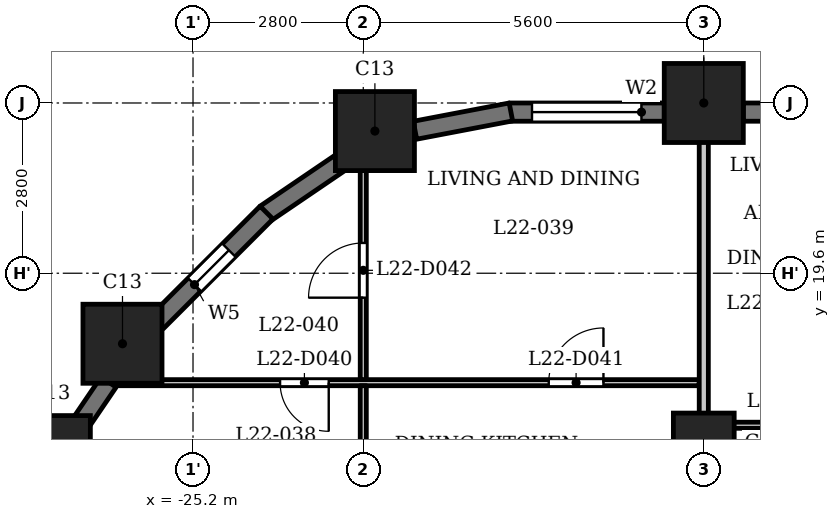
"""IFC4 building model, lengths in metres.
Left out: names, types, materials, properties, quantities, classifications, styles, units other than length and angle.
Written with IfcOpenShell. Run it as: python <this file> out.ifc"""

import sys

from ifc_helpers import new_model, si_unit, direction, frame, frame_2d, origin, origin_2d, place, context, subcontext, project, spatial, rectangle, extrude, element, fill, save


model = new_model("IFC4")
c1 = context("Model", 3, precision=1e-05, world=origin(), true_north=direction((0.0, 1.0)))
c2 = subcontext(c1, "Body", "Model", "MODEL_VIEW")
j1 = project(units=[si_unit("LENGTHUNIT", "METRE"), si_unit("PLANEANGLEUNIT", "RADIAN")], contexts=[c1])
p1 = place(None, origin())
s1 = spatial("IfcSite", under=j1, at=p1, CompositionType="ELEMENT")
p2 = place(p1, origin())
s2 = spatial("IfcBuilding", under=s1, at=p2, CompositionType="ELEMENT")
p3 = place(p2, frame((0.0, 0.0, 90.3)))
s3 = spatial("IfcBuildingStorey", under=s2, at=p3, CompositionType="ELEMENT", Elevation=90.3)
for number, where, z_axis, x_axis in (
    (1, (-16.8, 22.4, 0.0), (0.0, 0.0, 1.0), (1.0, 0.0, 0.0)),
    (2, (-22.209, 21.938, 0.0), (0.0, 0.0, 1.0), (1.0, 0.0, 0.0)),
    (3, (-26.36, 18.44, 0.0), (0.0, 0.0, 1.0), (1.0, 0.0, 0.0)),
    (4, (-27.538, 16.609, 0.0), (0.0, 0.0, 1.0), (1.0, 0.0, 0.0)),
):
    element("IfcColumn", number, at=place(p3, frame(where, z_axis=z_axis, x_axis=x_axis)), inside=s3, PredefinedType="COLUMN", context=c2, shape_type="SweptSolid", body=[
        extrude(rectangle(XDim=1.3, YDim=1.3, at=origin_2d()), origin(), (0.0, 0.0, 1.0), 3.5),
    ])
p4 = place(p3, frame((-16.8, 16.8, 0.0), z_axis=(0.0, 0.0, 1.0), x_axis=(1.0, 0.0, 0.0)))
e5 = element("IfcColumn", 5, at=p4, inside=s3, PredefinedType="COLUMN", context=c2, shape_type="SweptSolid", body=[
    extrude(rectangle(XDim=1.0, YDim=1.0, at=origin_2d()), origin(), (0.0, 0.0, 1.0), 3.5),
])
p5 = place(p3, frame((-11.85, 22.25, 0.0), z_axis=(0.0, 0.0, 1.0), x_axis=(-1.0, 0.0, 0.0)))
e6 = element("IfcWall", 6, at=p5, inside=s3, PredefinedType="SOLIDWALL", context=c2, shape_type="SweptSolid", body=[
    extrude(rectangle(XDim=4.3, YDim=0.3, at=frame_2d((2.15, 0.0))), origin(), (0.0, 0.0, 1.0), 2.4),
])
p6 = place(p5, frame((0.538, 0.0, 0.6)))
e7 = element("IfcOpeningElement", 7, at=p6, cuts=e6, PredefinedType="OPENING", context=c2, shape_type="SweptSolid", body=[
    extrude(rectangle(XDim=1.2, YDim=1.55, at=frame_2d((0.6, 0.775))), frame((0.0, 0.16, 0.0), z_axis=(0.0, -1.0, 0.0), x_axis=(1.0, 0.0, 0.0)), (0.0, 0.0, 1.0), 0.32),
])
p7 = place(p5, frame((2.762, 0.0, 0.6)))
e8 = element("IfcOpeningElement", 8, at=p7, cuts=e6, PredefinedType="OPENING", context=c2, shape_type="SweptSolid", body=[
    extrude(rectangle(XDim=1.2, YDim=1.55, at=frame_2d((0.6, 0.775))), frame((0.0, 0.16, 0.0), z_axis=(0.0, -1.0, 0.0), x_axis=(1.0, 0.0, 0.0)), (0.0, 0.0, 1.0), 0.32),
])
p8 = place(p3, frame((-17.45, 22.25, 0.0), z_axis=(0.0, 0.0, 1.0), x_axis=(-1.0, 0.0, 0.0)))
e9 = element("IfcWall", 9, at=p8, inside=s3, PredefinedType="SOLIDWALL", context=c2, shape_type="SweptSolid", body=[
    extrude(rectangle(XDim=2.55, YDim=0.3, at=frame_2d((1.275, 0.0))), origin(), (0.0, 0.0, 1.0), 2.4),
])
p9 = place(p8, frame((0.375, 0.0, 0.9)))
e10 = element("IfcOpeningElement", 10, at=p9, cuts=e9, PredefinedType="OPENING", context=c2, shape_type="SweptSolid", body=[
    extrude(rectangle(XDim=1.8, YDim=1.25, at=frame_2d((0.9, 0.625))), frame((0.0, 0.16, 0.0), z_axis=(0.0, -1.0, 0.0), x_axis=(1.0, 0.0, 0.0)), (0.0, 0.0, 1.0), 0.32),
])
for number, where, z_axis, x_axis in (
    (11, (-19.972, 22.253, 0.0), (0.0, 0.0, 1.0), (-0.982, -0.187, 0.0)),
    (12, (-22.684, 21.482, 0.0), (0.0, 0.0, 1.0), (-0.827, -0.562, 0.0)),
):
    element("IfcWall", number, at=place(p3, frame(where, z_axis=z_axis, x_axis=x_axis)), inside=s3, PredefinedType="SOLIDWALL", context=c2, shape_type="SweptSolid", body=[
        extrude(rectangle(XDim=1.606, YDim=0.3, at=frame_2d((0.803, 0.0))), origin(), (0.0, 0.0, 1.0), 2.4),
    ])
p10 = place(p3, frame((-23.991, 20.597, 0.0), z_axis=(0.0, 0.0, 1.0), x_axis=(-0.707106781187, -0.707106781187, 0.0)))
e13 = element("IfcWall", 13, at=p10, inside=s3, PredefinedType="SOLIDWALL", context=c2, shape_type="SweptSolid", body=[
    extrude(rectangle(XDim=2.55, YDim=0.3, at=frame_2d((1.275, 0.0))), origin(), (0.0, 0.0, 1.0), 2.4),
])
p11 = place(p10, frame((0.875, 0.0, 0.6)))
e14 = element("IfcOpeningElement", 14, at=p11, cuts=e13, PredefinedType="OPENING", context=c2, shape_type="SweptSolid", body=[
    extrude(rectangle(XDim=0.8, YDim=1.55, at=frame_2d((0.4, 0.775))), frame((0.0, 0.16, 0.0), z_axis=(0.0, -1.0, 0.0), x_axis=(1.0, 0.0, 0.0)), (0.0, 0.0, 1.0), 0.32),
])
p12 = place(p3, frame((-26.589, 17.81, 0.0), z_axis=(0.0, 0.0, 1.0), x_axis=(-0.562066330934, -0.827092159091, 0.0)))
e15 = element("IfcWall", 15, at=p12, inside=s3, PredefinedType="SOLIDWALL", context=c2, shape_type="SweptSolid", body=[
    extrude(rectangle(XDim=0.877, YDim=0.3, at=frame_2d((0.438, 0.0))), origin(), (0.0, 0.0, 1.0), 3.2),
])
p13 = place(p3, frame((-16.725, 17.1, 0.0), z_axis=(0.0, 0.0, 1.0), x_axis=(1.0, 0.0, 0.0)))
e16 = element("IfcWall", 16, at=p13, inside=s3, PredefinedType="PARTITIONING", context=c2, shape_type="SweptSolid", body=[
    extrude(rectangle(XDim=33.45, YDim=0.1, at=frame_2d((16.725, 0.0))), origin(), (0.0, 0.0, 1.0), 3.2),
])
p14 = place(p13, frame((3.925, 0.0, 0.0)))
e17 = element("IfcOpeningElement", 17, at=p14, cuts=e16, PredefinedType="OPENING", context=c2, shape_type="SweptSolid", body=[
    extrude(rectangle(XDim=0.8, YDim=2.1, at=frame_2d((0.4, 1.05))), frame((0.0, 0.06, 0.0), z_axis=(0.0, -1.0, 0.0), x_axis=(1.0, 0.0, 0.0)), (0.0, 0.0, 1.0), 0.12),
])
p15 = place(p13, frame((0.975, 0.0, 0.0)))
e18 = element("IfcOpeningElement", 18, at=p15, cuts=e16, PredefinedType="OPENING", context=c2, shape_type="SweptSolid", body=[
    extrude(rectangle(XDim=0.9, YDim=2.1, at=frame_2d((0.45, 1.05))), frame((0.0, 0.06, 0.0), z_axis=(0.0, -1.0, 0.0), x_axis=(1.0, 0.0, 0.0)), (0.0, 0.0, 1.0), 0.12),
])
p16 = place(p13, frame((6.425, 0.0, 0.0)))
e19 = element("IfcOpeningElement", 19, at=p16, cuts=e16, PredefinedType="OPENING", context=c2, shape_type="SweptSolid", body=[
    extrude(rectangle(XDim=0.8, YDim=2.1, at=frame_2d((0.4, 1.05))), frame((0.0, 0.06, 0.0), z_axis=(0.0, -1.0, 0.0), x_axis=(1.0, 0.0, 0.0)), (0.0, 0.0, 1.0), 0.12),
])
p17 = place(p13, frame((8.825, 0.0, 0.0)))
e20 = element("IfcOpeningElement", 20, at=p17, cuts=e16, PredefinedType="OPENING", context=c2, shape_type="SweptSolid", body=[
    extrude(rectangle(XDim=0.9, YDim=2.1, at=frame_2d((0.45, 1.05))), frame((0.0, 0.06, 0.0), z_axis=(0.0, -1.0, 0.0), x_axis=(1.0, 0.0, 0.0)), (0.0, 0.0, 1.0), 0.12),
])
p18 = place(p13, frame((12.375, 0.0, 0.0)))
e21 = element("IfcOpeningElement", 21, at=p18, cuts=e16, PredefinedType="OPENING", context=c2, shape_type="SweptSolid", body=[
    extrude(rectangle(XDim=0.9, YDim=2.1, at=frame_2d((0.45, 1.05))), frame((0.0, 0.06, 0.0), z_axis=(0.0, -1.0, 0.0), x_axis=(1.0, 0.0, 0.0)), (0.0, 0.0, 1.0), 0.12),
])
p19 = place(p13, frame((14.425, 0.0, 0.0)))
e22 = element("IfcOpeningElement", 22, at=p19, cuts=e16, PredefinedType="OPENING", context=c2, shape_type="SweptSolid", body=[
    extrude(rectangle(XDim=0.9, YDim=2.1, at=frame_2d((0.45, 1.05))), frame((0.0, 0.06, 0.0), z_axis=(0.0, -1.0, 0.0), x_axis=(1.0, 0.0, 0.0)), (0.0, 0.0, 1.0), 0.12),
])
p20 = place(p13, frame((26.225, 0.0, 0.0)))
e23 = element("IfcOpeningElement", 23, at=p20, cuts=e16, PredefinedType="OPENING", context=c2, shape_type="SweptSolid", body=[
    extrude(rectangle(XDim=0.8, YDim=2.1, at=frame_2d((0.4, 1.05))), frame((0.0, 0.06, 0.0), z_axis=(0.0, -1.0, 0.0), x_axis=(1.0, 0.0, 0.0)), (0.0, 0.0, 1.0), 0.12),
])
p21 = place(p13, frame((23.025, 0.0, 0.0)))
e24 = element("IfcOpeningElement", 24, at=p21, cuts=e16, PredefinedType="OPENING", context=c2, shape_type="SweptSolid", body=[
    extrude(rectangle(XDim=0.9, YDim=2.1, at=frame_2d((0.45, 1.05))), frame((0.0, 0.06, 0.0), z_axis=(0.0, -1.0, 0.0), x_axis=(1.0, 0.0, 0.0)), (0.0, 0.0, 1.0), 0.12),
])
p22 = place(p13, frame((17.775, 0.0, 0.0)))
e25 = element("IfcOpeningElement", 25, at=p22, cuts=e16, PredefinedType="OPENING", context=c2, shape_type="SweptSolid", body=[
    extrude(rectangle(XDim=0.9, YDim=2.1, at=frame_2d((0.45, 1.05))), frame((0.0, 0.06, 0.0), z_axis=(0.0, -1.0, 0.0), x_axis=(1.0, 0.0, 0.0)), (0.0, 0.0, 1.0), 0.12),
])
p23 = place(p13, frame((20.025, 0.0, 0.0)))
e26 = element("IfcOpeningElement", 26, at=p23, cuts=e16, PredefinedType="OPENING", context=c2, shape_type="SweptSolid", body=[
    extrude(rectangle(XDim=0.9, YDim=2.1, at=frame_2d((0.45, 1.05))), frame((0.0, 0.06, 0.0), z_axis=(0.0, -1.0, 0.0), x_axis=(1.0, 0.0, 0.0)), (0.0, 0.0, 1.0), 0.12),
])
p24 = place(p13, frame((28.825, 0.0, 0.0)))
e27 = element("IfcOpeningElement", 27, at=p24, cuts=e16, PredefinedType="OPENING", context=c2, shape_type="SweptSolid", body=[
    extrude(rectangle(XDim=0.8, YDim=2.1, at=frame_2d((0.4, 1.05))), frame((0.0, 0.06, 0.0), z_axis=(0.0, -1.0, 0.0), x_axis=(1.0, 0.0, 0.0)), (0.0, 0.0, 1.0), 0.12),
])
p25 = place(p13, frame((31.975, 0.0, 0.0)))
e28 = element("IfcOpeningElement", 28, at=p25, cuts=e16, PredefinedType="OPENING", context=c2, shape_type="SweptSolid", body=[
    extrude(rectangle(XDim=0.9, YDim=2.1, at=frame_2d((0.45, 1.05))), frame((0.0, 0.06, 0.0), z_axis=(0.0, -1.0, 0.0), x_axis=(1.0, 0.0, 0.0)), (0.0, 0.0, 1.0), 0.12),
])
p26 = place(p3, frame((-26.554, 17.8, 0.0), z_axis=(0.0, 0.0, 1.0), x_axis=(1.0, 0.0, 0.0)))
e29 = element("IfcWall", 29, at=p26, inside=s3, PredefinedType="PARTITIONING", context=c2, shape_type="SweptSolid", body=[
    extrude(rectangle(XDim=9.679, YDim=0.1, at=frame_2d((4.84, 0.0))), origin(), (0.0, 0.0, 1.0), 3.2),
])
p27 = place(p26, frame((2.786, 0.0, 0.0)))
e30 = element("IfcOpeningElement", 30, at=p27, cuts=e29, PredefinedType="OPENING", context=c2, shape_type="SweptSolid", body=[
    extrude(rectangle(XDim=0.8, YDim=2.1, at=frame_2d((0.4, 1.05))), frame((0.0, 0.06, 0.0), z_axis=(0.0, -1.0, 0.0), x_axis=(1.0, 0.0, 0.0)), (0.0, 0.0, 1.0), 0.12),
])
p28 = place(p26, frame((7.204, 0.0, 0.0)))
e31 = element("IfcOpeningElement", 31, at=p28, cuts=e29, PredefinedType="OPENING", context=c2, shape_type="SweptSolid", body=[
    extrude(rectangle(XDim=0.9, YDim=2.1, at=frame_2d((0.45, 1.05))), frame((0.0, 0.06, 0.0), z_axis=(0.0, -1.0, 0.0), x_axis=(1.0, 0.0, 0.0)), (0.0, 0.0, 1.0), 0.12),
])
p29 = place(p3, frame((-22.4, 15.475, 0.0), z_axis=(0.0, 0.0, 1.0), x_axis=(0.0, 1.0, 0.0)))
e32 = element("IfcWall", 32, at=p29, inside=s3, PredefinedType="PARTITIONING", context=c2, shape_type="SweptSolid", body=[
    extrude(rectangle(XDim=2.275, YDim=0.1, at=frame_2d((1.137, 0.0))), origin(), (0.0, 0.0, 1.0), 3.2),
])
p30 = place(p3, frame((-22.4, 17.85, 0.0), z_axis=(0.0, 0.0, 1.0), x_axis=(0.0, 1.0, 0.0)))
e33 = element("IfcWall", 33, at=p30, inside=s3, PredefinedType="PARTITIONING", context=c2, shape_type="SweptSolid", body=[
    extrude(rectangle(XDim=3.87, YDim=0.1, at=frame_2d((1.935, 0.0))), origin(), (0.0, 0.0, 1.0), 3.2),
])
p31 = place(p30, frame((1.348, 0.0, 0.0)))
e34 = element("IfcOpeningElement", 34, at=p31, cuts=e33, PredefinedType="OPENING", context=c2, shape_type="SweptSolid", body=[
    extrude(rectangle(XDim=0.9, YDim=2.1, at=frame_2d((0.45, 1.05))), frame((0.0, 0.06, 0.0), z_axis=(0.0, -1.0, 0.0), x_axis=(1.0, 0.0, 0.0)), (0.0, 0.0, 1.0), 0.12),
])
p32 = place(p3, frame((-16.8, 15.475, 0.0), z_axis=(0.0, 0.0, 1.0), x_axis=(0.0, 1.0, 0.0)))
e35 = element("IfcWall", 35, at=p32, inside=s3, PredefinedType="PARTITIONING", context=c2, shape_type="SweptSolid", body=[
    extrude(rectangle(XDim=7.555, YDim=0.15, at=frame_2d((3.777, 0.0))), origin(), (0.0, 0.0, 1.0), 3.2),
])
p33 = place(p27, origin())
e36 = element("IfcDoor", 36, at=p33, inside=s3, OperationType="SINGLE_SWING_RIGHT", PredefinedType="DOOR", context=c2, shape_type="SweptSolid", body=[
    extrude(rectangle(XDim=0.8, YDim=2.1, at=frame_2d((0.4, 1.05))), frame((0.0, 0.025, 0.0), z_axis=(0.0, -1.0, 0.0), x_axis=(1.0, 0.0, 0.0)), (0.0, 0.0, 1.0), 0.05),
])
fill(e30, e36)
p34 = place(p28, origin())
e37 = element("IfcDoor", 37, at=p34, inside=s3, OperationType="SINGLE_SWING_LEFT", PredefinedType="DOOR", context=c2, shape_type="SweptSolid", body=[
    extrude(rectangle(XDim=0.9, YDim=2.1, at=frame_2d((0.45, 1.05))), frame((0.0, 0.025, 0.0), z_axis=(0.0, -1.0, 0.0), x_axis=(1.0, 0.0, 0.0)), (0.0, 0.0, 1.0), 0.05),
])
fill(e31, e37)
p35 = place(p31, origin())
e38 = element("IfcDoor", 38, at=p35, inside=s3, OperationType="SINGLE_SWING_RIGHT", PredefinedType="DOOR", context=c2, shape_type="SweptSolid", body=[
    extrude(rectangle(XDim=0.9, YDim=2.1, at=frame_2d((0.45, 1.05))), frame((0.0, 0.025, 0.0), z_axis=(0.0, -1.0, 0.0), x_axis=(1.0, 0.0, 0.0)), (0.0, 0.0, 1.0), 0.05),
])
fill(e34, e38)
p36 = place(p9, origin())
e39 = element("IfcWindow", 39, at=p36, inside=s3, PartitioningType="SINGLE_PANEL", PredefinedType="WINDOW", context=c2, shape_type="SweptSolid", body=[
    extrude(rectangle(XDim=1.8, YDim=1.25, at=frame_2d((0.9, 0.625))), frame((0.0, 0.03, 0.0), z_axis=(0.0, -1.0, 0.0), x_axis=(1.0, 0.0, 0.0)), (0.0, 0.0, 1.0), 0.06),
])
fill(e10, e39)
p37 = place(p11, origin())
e40 = element("IfcWindow", 40, at=p37, inside=s3, PartitioningType="SINGLE_PANEL", PredefinedType="WINDOW", context=c2, shape_type="SweptSolid", body=[
    extrude(rectangle(XDim=0.8, YDim=1.55, at=frame_2d((0.4, 0.775))), frame((0.0, 0.03, 0.0), z_axis=(0.0, -1.0, 0.0), x_axis=(1.0, 0.0, 0.0)), (0.0, 0.0, 1.0), 0.06),
])
fill(e14, e40)
save(model, sys.argv[1])
